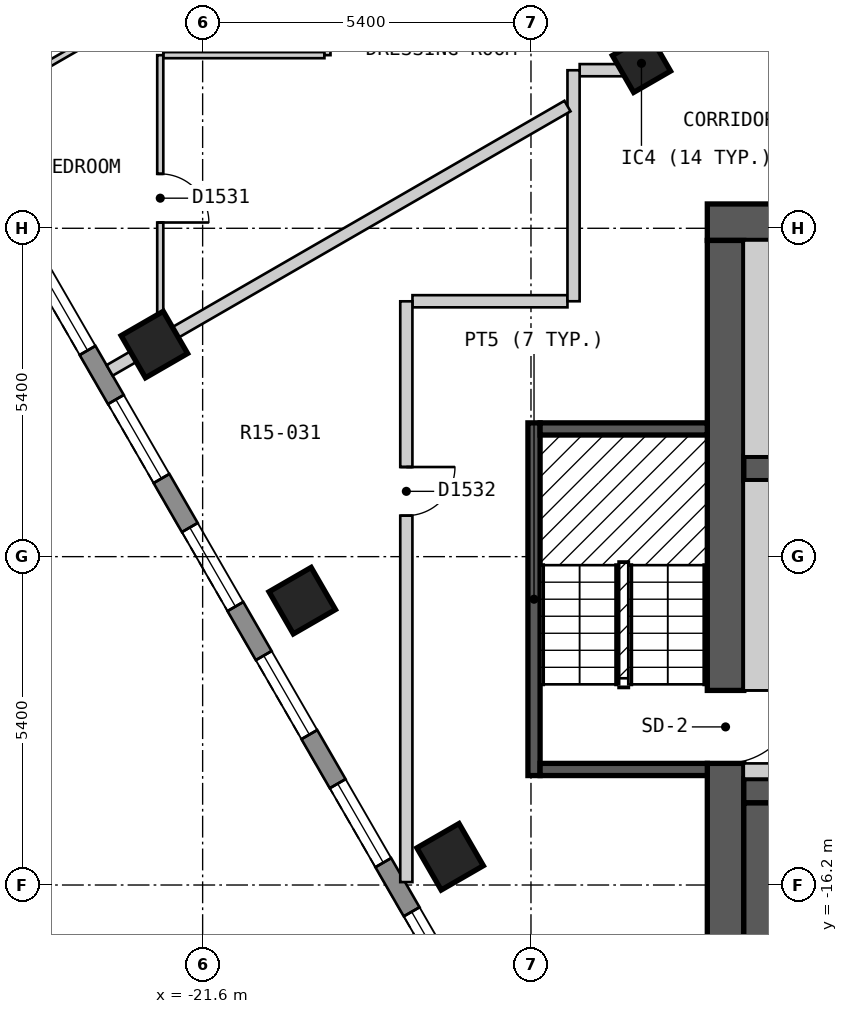
"""IFC4 building model, lengths in metres.
Left out: names, types, materials, properties, quantities, classifications, styles, units other than length and angle.
Written with IfcOpenShell. Run it as: python <this file> out.ifc"""

import sys

from ifc_helpers import new_model, si_unit, direction, frame, frame_2d, origin, origin_2d, place, context, subcontext, project, spatial, polyline, rectangle, outline, extrude, element, fill, save


model = new_model("IFC4")
c1 = context("Model", 3, precision=1e-05, world=origin(), true_north=direction((0.0, 1.0)))
c2 = subcontext(c1, "Body", "Model", "MODEL_VIEW")
j1 = project(units=[si_unit("LENGTHUNIT", "METRE"), si_unit("PLANEANGLEUNIT", "RADIAN")], contexts=[c1])
p1 = place(None, origin())
s1 = spatial("IfcSite", under=j1, at=p1, CompositionType="ELEMENT")
p2 = place(p1, origin())
s2 = spatial("IfcBuilding", under=s1, at=p2, CompositionType="ELEMENT")
p3 = place(p2, frame((0.0, 0.0, 184.2)))
s3 = spatial("IfcBuildingStorey", under=s2, at=p3, CompositionType="ELEMENT", Elevation=184.2)
for number, where, z_axis, x_axis in (
    (1, (-22.394, -7.312, 0.0), (0.0, 0.0, 1.0), (0.5, -0.866, 0.0)),
    (2, (-19.962, -11.524, 0.0), (0.0, 0.0, 1.0), (0.5, -0.866, 0.0)),
    (3, (-17.53, -15.736, 0.0), (0.0, 0.0, 1.0), (0.5, -0.866, 0.0)),
):
    element("IfcColumn", number, at=place(p3, frame(where, z_axis=z_axis, x_axis=x_axis)), inside=s3, PredefinedType="COLUMN", context=c2, shape_type="SweptSolid", body=[
        extrude(rectangle(XDim=0.8, YDim=0.8, at=origin_2d()), origin(), (0.0, 0.0, 1.0), 3.0),
    ])
p4 = place(p3, frame((-14.383, -2.687, 0.0), z_axis=(0.0, 0.0, 1.0), x_axis=(0.5, -0.866025403784, 0.0)))
e4 = element("IfcColumn", 4, at=p4, inside=s3, PredefinedType="COLUMN", context=c2, shape_type="SweptSolid", body=[
    extrude(rectangle(XDim=0.7, YDim=0.7, at=origin_2d()), origin(), (0.0, 0.0, 1.0), 3.0),
])
p5 = place(p3, frame((-13.3, -5.3, 0.0), z_axis=(0.0, 0.0, 1.0), x_axis=(1.0, 0.0, 0.0)))
e5 = element("IfcWall", 5, at=p5, inside=s3, PredefinedType="SHEAR", context=c2, shape_type="SweptSolid", body=[
    extrude(rectangle(XDim=26.6, YDim=0.6, at=frame_2d((13.3, 0.0))), origin(), (0.0, 0.0, 1.0), 2.7),
])
p6 = place(p5, frame((23.65, 0.0, 0.0)))
e6 = element("IfcOpeningElement", 6, at=p6, cuts=e5, PredefinedType="OPENING", context=c2, shape_type="SweptSolid", body=[
    extrude(rectangle(XDim=1.2, YDim=2.1, at=frame_2d((0.6, 1.05))), frame((0.0, 0.31, 0.0), z_axis=(0.0, -1.0, 0.0), x_axis=(1.0, 0.0, 0.0)), (0.0, 0.0, 1.0), 0.62),
])
p7 = place(p3, frame((-13.0, -18.4, 0.0), z_axis=(0.0, 0.0, 1.0), x_axis=(0.0, 1.0, 0.0)))
e7 = element("IfcWall", 7, at=p7, inside=s3, PredefinedType="SHEAR", context=c2, shape_type="SweptSolid", body=[
    extrude(rectangle(XDim=12.8, YDim=0.6, at=frame_2d((6.4, 0.0))), origin(), (0.0, 0.0, 1.0), 2.7),
])
p8 = place(p7, frame((4.2, 0.0, 0.0)))
e8 = element("IfcOpeningElement", 8, at=p8, cuts=e7, PredefinedType="OPENING", context=c2, shape_type="SweptSolid", body=[
    extrude(rectangle(XDim=1.2, YDim=2.1, at=frame_2d((0.6, 1.05))), frame((0.0, 0.31, 0.0), z_axis=(0.0, -1.0, 0.0), x_axis=(1.0, 0.0, 0.0)), (0.0, 0.0, 1.0), 0.62),
])
p9 = place(p3, frame((-12.7, -14.65, 0.0), z_axis=(0.0, 0.0, 1.0), x_axis=(1.0, 0.0, 0.0)))
e9 = element("IfcWall", 9, at=p9, inside=s3, PredefinedType="SHEAR", context=c2, shape_type="SweptSolid", body=[
    extrude(rectangle(XDim=25.4, YDim=0.4, at=frame_2d((12.7, 0.0))), origin(), (0.0, 0.0, 1.0), 2.7),
])
p10 = place(p9, frame((1.9, 0.0, 0.0), z_axis=(0.0, 0.0, 1.0), x_axis=(-1.0, 0.0, 0.0)))
e10 = element("IfcOpeningElement", 10, at=p10, cuts=e9, PredefinedType="OPENING", context=c2, shape_type="SweptSolid", body=[
    extrude(rectangle(XDim=1.2, YDim=2.1, at=frame_2d((0.6, 1.05))), frame((0.0, 0.21, 0.0), z_axis=(0.0, -1.0, 0.0), x_axis=(1.0, 0.0, 0.0)), (0.0, 0.0, 1.0), 0.42),
])
p11 = place(p9, frame((24.75, 0.0, 0.0), z_axis=(0.0, 0.0, 1.0), x_axis=(-1.0, 0.0, 0.0)))
e11 = element("IfcOpeningElement", 11, at=p11, cuts=e9, PredefinedType="OPENING", context=c2, shape_type="SweptSolid", body=[
    extrude(rectangle(XDim=1.2, YDim=2.1, at=frame_2d((0.6, 1.05))), frame((0.0, 0.21, 0.0), z_axis=(0.0, -1.0, 0.0), x_axis=(1.0, 0.0, 0.0)), (0.0, 0.0, 1.0), 0.42),
])
p12 = place(p9, frame((9.85, 0.0, 0.0), z_axis=(0.0, 0.0, 1.0), x_axis=(-1.0, 0.0, 0.0)))
e12 = element("IfcOpeningElement", 12, at=p12, cuts=e9, PredefinedType="OPENING", context=c2, shape_type="SweptSolid", body=[
    extrude(rectangle(XDim=1.0, YDim=2.1, at=frame_2d((0.5, 1.05))), frame((0.0, 0.21, 0.0), z_axis=(0.0, -1.0, 0.0), x_axis=(1.0, 0.0, 0.0)), (0.0, 0.0, 1.0), 0.42),
])
p13 = place(p9, frame((16.25, 0.0, 0.0), z_axis=(0.0, 0.0, 1.0), x_axis=(-1.0, 0.0, 0.0)))
e13 = element("IfcOpeningElement", 13, at=p13, cuts=e9, PredefinedType="OPENING", context=c2, shape_type="SweptSolid", body=[
    extrude(rectangle(XDim=1.0, YDim=2.1, at=frame_2d((0.5, 1.05))), frame((0.0, 0.21, 0.0), z_axis=(0.0, -1.0, 0.0), x_axis=(1.0, 0.0, 0.0)), (0.0, 0.0, 1.0), 0.42),
])
p14 = place(p3, frame((-12.7, -9.35, 0.0), z_axis=(0.0, 0.0, 1.0), x_axis=(1.0, 0.0, 0.0)))
e14 = element("IfcWall", 14, at=p14, inside=s3, PredefinedType="SHEAR", context=c2, shape_type="SweptSolid", body=[
    extrude(rectangle(XDim=22.9, YDim=0.4, at=frame_2d((11.45, 0.0))), origin(), (0.0, 0.0, 1.0), 2.7),
])
p15 = place(p14, frame((1.3, 0.0, 0.0)))
e15 = element("IfcOpeningElement", 15, at=p15, cuts=e14, PredefinedType="OPENING", context=c2, shape_type="SweptSolid", body=[
    extrude(rectangle(XDim=1.1, YDim=2.1, at=frame_2d((0.55, 1.05))), frame((0.0, 0.21, 0.0), z_axis=(0.0, -1.0, 0.0), x_axis=(1.0, 0.0, 0.0)), (0.0, 0.0, 1.0), 0.42),
])
p16 = place(p14, frame((4.1, 0.0, 0.0)))
e16 = element("IfcOpeningElement", 16, at=p16, cuts=e14, PredefinedType="OPENING", context=c2, shape_type="SweptSolid", body=[
    extrude(rectangle(XDim=1.1, YDim=2.1, at=frame_2d((0.55, 1.05))), frame((0.0, 0.21, 0.0), z_axis=(0.0, -1.0, 0.0), x_axis=(1.0, 0.0, 0.0)), (0.0, 0.0, 1.0), 0.42),
])
p17 = place(p14, frame((6.9, 0.0, 0.0)))
e17 = element("IfcOpeningElement", 17, at=p17, cuts=e14, PredefinedType="OPENING", context=c2, shape_type="SweptSolid", body=[
    extrude(rectangle(XDim=1.1, YDim=2.1, at=frame_2d((0.55, 1.05))), frame((0.0, 0.21, 0.0), z_axis=(0.0, -1.0, 0.0), x_axis=(1.0, 0.0, 0.0)), (0.0, 0.0, 1.0), 0.42),
])
p18 = place(p14, frame((9.2, 0.0, 0.0)))
e18 = element("IfcOpeningElement", 18, at=p18, cuts=e14, PredefinedType="OPENING", context=c2, shape_type="SweptSolid", body=[
    extrude(rectangle(XDim=1.1, YDim=2.1, at=frame_2d((0.55, 1.05))), frame((0.0, 0.21, 0.0), z_axis=(0.0, -1.0, 0.0), x_axis=(1.0, 0.0, 0.0)), (0.0, 0.0, 1.0), 0.42),
])
p19 = place(p14, frame((11.5, 0.0, 0.0)))
e19 = element("IfcOpeningElement", 19, at=p19, cuts=e14, PredefinedType="OPENING", context=c2, shape_type="SweptSolid", body=[
    extrude(rectangle(XDim=1.1, YDim=2.1, at=frame_2d((0.55, 1.05))), frame((0.0, 0.21, 0.0), z_axis=(0.0, -1.0, 0.0), x_axis=(1.0, 0.0, 0.0)), (0.0, 0.0, 1.0), 0.42),
])
p20 = place(p14, frame((13.8, 0.0, 0.0)))
e20 = element("IfcOpeningElement", 20, at=p20, cuts=e14, PredefinedType="OPENING", context=c2, shape_type="SweptSolid", body=[
    extrude(rectangle(XDim=1.1, YDim=2.1, at=frame_2d((0.55, 1.05))), frame((0.0, 0.21, 0.0), z_axis=(0.0, -1.0, 0.0), x_axis=(1.0, 0.0, 0.0)), (0.0, 0.0, 1.0), 0.42),
])
p21 = place(p14, frame((16.1, 0.0, 0.0)))
e21 = element("IfcOpeningElement", 21, at=p21, cuts=e14, PredefinedType="OPENING", context=c2, shape_type="SweptSolid", body=[
    extrude(rectangle(XDim=1.1, YDim=2.1, at=frame_2d((0.55, 1.05))), frame((0.0, 0.21, 0.0), z_axis=(0.0, -1.0, 0.0), x_axis=(1.0, 0.0, 0.0)), (0.0, 0.0, 1.0), 0.42),
])
p22 = place(p14, frame((18.4, 0.0, 0.0)))
e22 = element("IfcOpeningElement", 22, at=p22, cuts=e14, PredefinedType="OPENING", context=c2, shape_type="SweptSolid", body=[
    extrude(rectangle(XDim=1.1, YDim=2.1, at=frame_2d((0.55, 1.05))), frame((0.0, 0.21, 0.0), z_axis=(0.0, -1.0, 0.0), x_axis=(1.0, 0.0, 0.0)), (0.0, 0.0, 1.0), 0.42),
])
p23 = place(p14, frame((20.8, 0.0, 0.0)))
e23 = element("IfcOpeningElement", 23, at=p23, cuts=e14, PredefinedType="OPENING", context=c2, shape_type="SweptSolid", body=[
    extrude(rectangle(XDim=1.1, YDim=2.1, at=frame_2d((0.55, 1.05))), frame((0.0, 0.21, 0.0), z_axis=(0.0, -1.0, 0.0), x_axis=(1.0, 0.0, 0.0)), (0.0, 0.0, 1.0), 0.42),
])
p24 = place(p3, frame((-26.024, -3.025, 0.0), z_axis=(0.0, 0.0, 1.0), x_axis=(0.500018670445, -0.86601462413, 0.0)))
e24 = element("IfcWall", 24, at=p24, inside=s3, PredefinedType="SOLIDWALL", context=c2, shape_type="SweptSolid", body=[
    extrude(outline(polyline([(0.0, -0.15), (20.785, -0.15), (20.705, 0.15), (0.08, 0.15), (0.0, -0.15)])), origin(), (0.0, 0.0, 1.0), 2.7),
])
p25 = place(p24, frame((1.13, 0.0, 0.15)))
e25 = element("IfcOpeningElement", 25, at=p25, cuts=e24, PredefinedType="OPENING", context=c2, shape_type="SweptSolid", body=[
    extrude(rectangle(XDim=1.5, YDim=2.1, at=frame_2d((0.75, 1.05))), frame((0.0, 0.16, 0.0), z_axis=(0.0, -1.0, 0.0), x_axis=(1.0, 0.0, 0.0)), (0.0, 0.0, 1.0), 0.32),
])
p26 = place(p24, frame((3.562, 0.0, 0.15)))
e26 = element("IfcOpeningElement", 26, at=p26, cuts=e24, PredefinedType="OPENING", context=c2, shape_type="SweptSolid", body=[
    extrude(rectangle(XDim=1.5, YDim=2.1, at=frame_2d((0.75, 1.05))), frame((0.0, 0.16, 0.0), z_axis=(0.0, -1.0, 0.0), x_axis=(1.0, 0.0, 0.0)), (0.0, 0.0, 1.0), 0.32),
])
p27 = place(p24, frame((5.994, 0.0, 0.15)))
e27 = element("IfcOpeningElement", 27, at=p27, cuts=e24, PredefinedType="OPENING", context=c2, shape_type="SweptSolid", body=[
    extrude(rectangle(XDim=1.5, YDim=2.1, at=frame_2d((0.75, 1.05))), frame((0.0, 0.16, 0.0), z_axis=(0.0, -1.0, 0.0), x_axis=(1.0, 0.0, 0.0)), (0.0, 0.0, 1.0), 0.32),
])
p28 = place(p24, frame((8.425, 0.0, 0.15)))
e28 = element("IfcOpeningElement", 28, at=p28, cuts=e24, PredefinedType="OPENING", context=c2, shape_type="SweptSolid", body=[
    extrude(rectangle(XDim=1.5, YDim=2.1, at=frame_2d((0.75, 1.05))), frame((0.0, 0.16, 0.0), z_axis=(0.0, -1.0, 0.0), x_axis=(1.0, 0.0, 0.0)), (0.0, 0.0, 1.0), 0.32),
])
p29 = place(p24, frame((10.857, 0.0, 0.15)))
e29 = element("IfcOpeningElement", 29, at=p29, cuts=e24, PredefinedType="OPENING", context=c2, shape_type="SweptSolid", body=[
    extrude(rectangle(XDim=1.5, YDim=2.1, at=frame_2d((0.75, 1.05))), frame((0.0, 0.16, 0.0), z_axis=(0.0, -1.0, 0.0), x_axis=(1.0, 0.0, 0.0)), (0.0, 0.0, 1.0), 0.32),
])
p30 = place(p24, frame((13.289, 0.0, 0.15)))
e30 = element("IfcOpeningElement", 30, at=p30, cuts=e24, PredefinedType="OPENING", context=c2, shape_type="SweptSolid", body=[
    extrude(rectangle(XDim=1.5, YDim=2.1, at=frame_2d((0.75, 1.05))), frame((0.0, 0.16, 0.0), z_axis=(0.0, -1.0, 0.0), x_axis=(1.0, 0.0, 0.0)), (0.0, 0.0, 1.0), 0.32),
])
p31 = place(p24, frame((15.722, 0.0, 0.15)))
e31 = element("IfcOpeningElement", 31, at=p31, cuts=e24, PredefinedType="OPENING", context=c2, shape_type="SweptSolid", body=[
    extrude(rectangle(XDim=1.5, YDim=2.1, at=frame_2d((0.75, 1.05))), frame((0.0, 0.16, 0.0), z_axis=(0.0, -1.0, 0.0), x_axis=(1.0, 0.0, 0.0)), (0.0, 0.0, 1.0), 0.32),
])
p32 = place(p24, frame((18.154, 0.0, 0.15)))
e32 = element("IfcOpeningElement", 32, at=p32, cuts=e24, PredefinedType="OPENING", context=c2, shape_type="SweptSolid", body=[
    extrude(rectangle(XDim=1.5, YDim=2.1, at=frame_2d((0.75, 1.05))), frame((0.0, 0.16, 0.0), z_axis=(0.0, -1.0, 0.0), x_axis=(1.0, 0.0, 0.0)), (0.0, 0.0, 1.0), 0.32),
])
for number, where, z_axis, x_axis in (
    (33, (-12.99, -0.701, 0.0), (0.0, 0.0, 1.0), (0.5, -0.866, 0.0)),
    (34, (-15.53, -0.701, 0.0), (0.0, 0.0, 1.0), (0.5, -0.866, 0.0)),
):
    element("IfcWall", number, at=place(p3, frame(where, z_axis=z_axis, x_axis=x_axis)), inside=s3, PredefinedType="PARTITIONING", context=c2, shape_type="SweptSolid", body=[
        extrude(rectangle(XDim=2.308, YDim=0.2, at=frame_2d((1.154, 0.0))), origin(), (0.0, 0.0, 1.0), 2.7),
    ])
p33 = place(p3, frame((-18.149, -6.6, 0.0), z_axis=(0.0, 0.0, 1.0), x_axis=(1.0, 0.0, 0.0)))
e35 = element("IfcWall", 35, at=p33, inside=s3, PredefinedType="PARTITIONING", context=c2, shape_type="SweptSolid", body=[
    extrude(rectangle(XDim=2.549, YDim=0.2, at=frame_2d((1.274, 0.0))), origin(), (0.0, 0.0, 1.0), 2.7),
])
p34 = place(p3, frame((-15.399, -2.8, 0.0), z_axis=(0.0, 0.0, 1.0), x_axis=(1.0, 0.0, 0.0)))
e36 = element("IfcWall", 36, at=p34, inside=s3, PredefinedType="PARTITIONING", context=c2, shape_type="SweptSolid", body=[
    extrude(rectangle(XDim=1.081, YDim=0.2, at=frame_2d((0.541, 0.0))), origin(), (0.0, 0.0, 1.0), 2.7),
])
p35 = place(p3, frame((-15.5, -6.6, 0.0), z_axis=(0.0, 0.0, 1.0), x_axis=(0.0, 1.0, 0.0)))
e37 = element("IfcWall", 37, at=p35, inside=s3, PredefinedType="PARTITIONING", context=c2, shape_type="SweptSolid", body=[
    extrude(rectangle(XDim=3.799, YDim=0.2, at=frame_2d((1.899, 0.0))), origin(), (0.0, 0.0, 1.0), 2.7),
])
p36 = place(p3, frame((-18.25, -16.152, 0.0), z_axis=(0.0, 0.0, 1.0), x_axis=(0.0, 1.0, 0.0)))
e38 = element("IfcWall", 38, at=p36, inside=s3, PredefinedType="PARTITIONING", context=c2, shape_type="SweptSolid", body=[
    extrude(rectangle(XDim=9.551, YDim=0.2, at=frame_2d((4.775, 0.0))), origin(), (0.0, 0.0, 1.0), 2.7),
])
p37 = place(p36, frame((6.026, 0.0, 0.0)))
e39 = element("IfcOpeningElement", 39, at=p37, cuts=e38, PredefinedType="OPENING", context=c2, shape_type="SweptSolid", body=[
    extrude(rectangle(XDim=0.8, YDim=2.1, at=frame_2d((0.4, 1.05))), frame((0.0, 0.11, 0.0), z_axis=(0.0, -1.0, 0.0), x_axis=(1.0, 0.0, 0.0)), (0.0, 0.0, 1.0), 0.22),
])
p38 = place(p3, frame((-22.247, -2.553, 0.0), z_axis=(0.0, 0.0, 1.0), x_axis=(1.0, 0.0, 0.0)))
e40 = element("IfcWall", 40, at=p38, inside=s3, PredefinedType="PARTITIONING", context=c2, shape_type="SweptSolid", body=[
    extrude(rectangle(XDim=2.65, YDim=0.1, at=frame_2d((1.325, 0.0))), origin(), (0.0, 0.0, 1.0), 2.7),
])
p39 = place(p3, frame((-19.547, -2.553, 0.0), z_axis=(0.0, 0.0, 1.0), x_axis=(0.0, 1.0, 0.0)))
e41 = element("IfcWall", 41, at=p39, inside=s3, PredefinedType="PARTITIONING", context=c2, shape_type="SweptSolid", body=[
    extrude(rectangle(XDim=0.715, YDim=0.1, at=frame_2d((0.357, 0.0))), origin(), (0.0, 0.0, 1.0), 2.7),
])
p40 = place(p3, frame((-22.297, -7.141, 0.0), z_axis=(0.0, 0.0, 1.0), x_axis=(0.0, 1.0, 0.0)))
e42 = element("IfcWall", 42, at=p40, inside=s3, PredefinedType="PARTITIONING", context=c2, shape_type="SweptSolid", body=[
    extrude(rectangle(XDim=4.588, YDim=0.1, at=frame_2d((2.294, 0.0))), origin(), (0.0, 0.0, 1.0), 2.7),
])
p41 = place(p40, frame((1.836, 0.0, 0.0)))
e43 = element("IfcOpeningElement", 43, at=p41, cuts=e42, PredefinedType="OPENING", context=c2, shape_type="SweptSolid", body=[
    extrude(rectangle(XDim=0.8, YDim=2.1, at=frame_2d((0.4, 1.05))), frame((0.0, 0.06, 0.0), z_axis=(0.0, -1.0, 0.0), x_axis=(1.0, 0.0, 0.0)), (0.0, 0.0, 1.0), 0.12),
])
p42 = place(p3, frame((-25.563, -3.524, 0.0), z_axis=(0.0, 0.0, 1.0), x_axis=(0.866128586522, 0.499821239653, 0.0)))
e44 = element("IfcWall", 44, at=p42, inside=s3, PredefinedType="PARTITIONING", context=c2, shape_type="SweptSolid", body=[
    extrude(rectangle(XDim=5.848, YDim=0.1, at=frame_2d((2.924, 0.0))), origin(), (0.0, 0.0, 1.0), 2.7),
])
p43 = place(p42, frame((2.474, 0.0, 0.0)))
e45 = element("IfcOpeningElement", 45, at=p43, cuts=e44, PredefinedType="OPENING", context=c2, shape_type="SweptSolid", body=[
    extrude(rectangle(XDim=0.9, YDim=2.1, at=frame_2d((0.45, 1.05))), frame((0.0, 0.06, 0.0), z_axis=(0.0, -1.0, 0.0), x_axis=(1.0, 0.0, 0.0)), (0.0, 0.0, 1.0), 0.12),
])
p44 = place(p3, frame((-23.13, -7.737, 0.0), z_axis=(0.0, 0.0, 1.0), x_axis=(0.866033148899, 0.499986584829, 0.0)))
e46 = element("IfcWall", 46, at=p44, inside=s3, PredefinedType="PARTITIONING", context=c2, shape_type="SweptSolid", body=[
    extrude(rectangle(XDim=8.695, YDim=0.2, at=frame_2d((4.347, 0.0))), origin(), (0.0, 0.0, 1.0), 2.7),
])
p45 = place(p3, frame((-16.15, -14.4, 0.0), z_axis=(0.0, 0.0, 1.0), x_axis=(0.0, 1.0, 0.0)))
e47 = element("IfcWall", 47, at=p45, inside=s3, PredefinedType="SOLIDWALL", context=c2, shape_type="SweptSolid", body=[
    extrude(rectangle(XDim=5.8, YDim=0.2, at=frame_2d((2.9, 0.0))), origin(), (0.0, 0.0, 1.0), 2.7),
])
for number, where, z_axis, x_axis in (
    (48, (-16.05, -14.3, 0.0), (0.0, 0.0, 1.0), (1.0, 0.0, 0.0)),
    (49, (-16.05, -8.7, 0.0), (0.0, 0.0, 1.0), (1.0, 0.0, 0.0)),
):
    element("IfcWall", number, at=place(p3, frame(where, z_axis=z_axis, x_axis=x_axis)), inside=s3, PredefinedType="SOLIDWALL", context=c2, shape_type="SweptSolid", body=[
        extrude(rectangle(XDim=2.75, YDim=0.2, at=frame_2d((1.375, 0.0))), origin(), (0.0, 0.0, 1.0), 2.7),
    ])
p46 = place(p3, frame((-12.4, -18.4, 0.0), z_axis=(0.0, 0.0, 1.0), x_axis=(0.0, 1.0, 0.0)))
e50 = element("IfcWall", 50, at=p46, inside=s3, PredefinedType="SOLIDWALL", context=c2, shape_type="SweptSolid", body=[
    extrude(rectangle(XDim=3.55, YDim=0.6, at=frame_2d((1.775, 0.0))), origin(), (0.0, 0.0, 1.0), 2.7),
])
p47 = place(p3, frame((-12.7, -14.325, 0.0), z_axis=(0.0, 0.0, 1.0), x_axis=(1.0, 0.0, 0.0)))
e51 = element("IfcWall", 51, at=p47, inside=s3, PredefinedType="PARTITIONING", context=c2, shape_type="SweptSolid", body=[
    extrude(rectangle(XDim=0.6, YDim=0.25, at=frame_2d((0.3, 0.0))), origin(), (0.0, 0.0, 1.0), 2.7),
])
p48 = place(p3, frame((-12.4, -13.0, 0.0), z_axis=(0.0, 0.0, 1.0), x_axis=(0.0, 1.0, 0.0)))
e52 = element("IfcWall", 52, at=p48, inside=s3, PredefinedType="PARTITIONING", context=c2, shape_type="SweptSolid", body=[
    extrude(rectangle(XDim=3.45, YDim=0.6, at=frame_2d((1.725, 0.0))), origin(), (0.0, 0.0, 1.0), 2.7),
])
p49 = place(p3, frame((-12.4, -9.15, 0.0), z_axis=(0.0, 0.0, 1.0), x_axis=(0.0, 1.0, 0.0)))
e53 = element("IfcWall", 53, at=p49, inside=s3, PredefinedType="SOLIDWALL", context=c2, shape_type="SweptSolid", body=[
    extrude(rectangle(XDim=3.55, YDim=0.6, at=frame_2d((1.775, 0.0))), origin(), (0.0, 0.0, 1.0), 2.7),
])
p50 = place(p26, origin())
e54 = element("IfcWindow", 54, at=p50, inside=s3, PartitioningType="SINGLE_PANEL", PredefinedType="WINDOW", context=c2, shape_type="SweptSolid", body=[
    extrude(rectangle(XDim=1.5, YDim=2.1, at=frame_2d((0.75, 1.05))), frame((0.0, 0.03, 0.0), z_axis=(0.0, -1.0, 0.0), x_axis=(1.0, 0.0, 0.0)), (0.0, 0.0, 1.0), 0.06),
])
fill(e26, e54)
p51 = place(p27, origin())
e55 = element("IfcWindow", 55, at=p51, inside=s3, PartitioningType="SINGLE_PANEL", PredefinedType="WINDOW", context=c2, shape_type="SweptSolid", body=[
    extrude(rectangle(XDim=1.5, YDim=2.1, at=frame_2d((0.75, 1.05))), frame((0.0, 0.03, 0.0), z_axis=(0.0, -1.0, 0.0), x_axis=(1.0, 0.0, 0.0)), (0.0, 0.0, 1.0), 0.06),
])
fill(e27, e55)
p52 = place(p28, origin())
e56 = element("IfcWindow", 56, at=p52, inside=s3, PartitioningType="SINGLE_PANEL", PredefinedType="WINDOW", context=c2, shape_type="SweptSolid", body=[
    extrude(rectangle(XDim=1.5, YDim=2.1, at=frame_2d((0.75, 1.05))), frame((0.0, 0.03, 0.0), z_axis=(0.0, -1.0, 0.0), x_axis=(1.0, 0.0, 0.0)), (0.0, 0.0, 1.0), 0.06),
])
fill(e28, e56)
p53 = place(p29, origin())
e57 = element("IfcWindow", 57, at=p53, inside=s3, PartitioningType="SINGLE_PANEL", PredefinedType="WINDOW", context=c2, shape_type="SweptSolid", body=[
    extrude(rectangle(XDim=1.5, YDim=2.1, at=frame_2d((0.75, 1.05))), frame((0.0, 0.03, 0.0), z_axis=(0.0, -1.0, 0.0), x_axis=(1.0, 0.0, 0.0)), (0.0, 0.0, 1.0), 0.06),
])
fill(e29, e57)
p54 = place(p30, origin())
e58 = element("IfcWindow", 58, at=p54, inside=s3, PartitioningType="SINGLE_PANEL", PredefinedType="WINDOW", context=c2, shape_type="SweptSolid", body=[
    extrude(rectangle(XDim=1.5, YDim=2.1, at=frame_2d((0.75, 1.05))), frame((0.0, 0.03, 0.0), z_axis=(0.0, -1.0, 0.0), x_axis=(1.0, 0.0, 0.0)), (0.0, 0.0, 1.0), 0.06),
])
fill(e30, e58)
p55 = place(p31, origin())
e59 = element("IfcWindow", 59, at=p55, inside=s3, PartitioningType="SINGLE_PANEL", PredefinedType="WINDOW", context=c2, shape_type="SweptSolid", body=[
    extrude(rectangle(XDim=1.5, YDim=2.1, at=frame_2d((0.75, 1.05))), frame((0.0, 0.03, 0.0), z_axis=(0.0, -1.0, 0.0), x_axis=(1.0, 0.0, 0.0)), (0.0, 0.0, 1.0), 0.06),
])
fill(e31, e59)
p56 = place(p41, origin())
e60 = element("IfcDoor", 60, at=p56, inside=s3, OperationType="SINGLE_SWING_LEFT", PredefinedType="DOOR", context=c2, shape_type="SweptSolid", body=[
    extrude(rectangle(XDim=0.8, YDim=2.1, at=frame_2d((0.4, 1.05))), frame((0.0, 0.025, 0.0), z_axis=(0.0, -1.0, 0.0), x_axis=(1.0, 0.0, 0.0)), (0.0, 0.0, 1.0), 0.05),
])
fill(e43, e60)
p57 = place(p37, origin())
e61 = element("IfcDoor", 61, at=p57, inside=s3, OperationType="SINGLE_SWING_RIGHT", PredefinedType="DOOR", context=c2, shape_type="SweptSolid", body=[
    extrude(rectangle(XDim=0.8, YDim=2.1, at=frame_2d((0.4, 1.05))), frame((0.0, 0.025, 0.0), z_axis=(0.0, -1.0, 0.0), x_axis=(1.0, 0.0, 0.0)), (0.0, 0.0, 1.0), 0.05),
])
fill(e39, e61)
p58 = place(p8, origin())
e62 = element("IfcDoor", 62, at=p58, inside=s3, OperationType="SINGLE_SWING_RIGHT", PredefinedType="DOOR", context=c2, shape_type="SweptSolid", body=[
    extrude(rectangle(XDim=1.2, YDim=2.1, at=frame_2d((0.6, 1.05))), frame((0.0, 0.025, 0.0), z_axis=(0.0, -1.0, 0.0), x_axis=(1.0, 0.0, 0.0)), (0.0, 0.0, 1.0), 0.05),
])
fill(e8, e62)
save(model, sys.argv[1])
